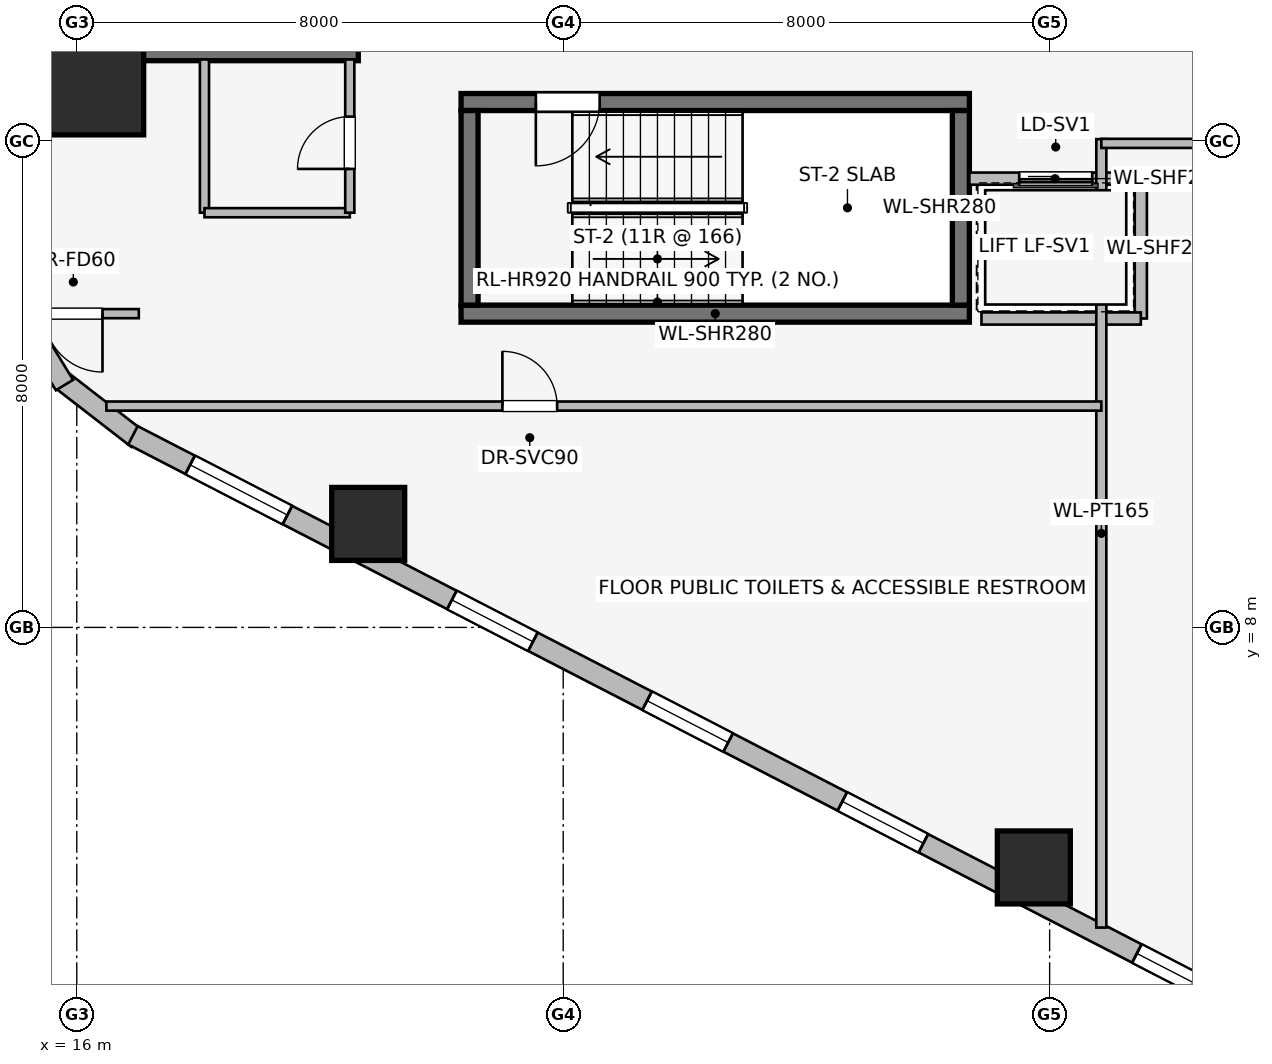
"""IFC4 building model, lengths in metres.
Left out: names, types, materials, properties, quantities, classifications, styles, units other than length and angle.
Written with IfcOpenShell. Run it as: python <this file> out.ifc"""

import sys

from ifc_helpers import new_model, si_unit, direction, frame, frame_2d, origin, origin_2d, place, context, subcontext, project, spatial, rectangle, extrude, element, fill, save


model = new_model("IFC4")
c1 = context("Model", 3, precision=1e-05, world=origin(), true_north=direction((0.0, 1.0)))
c2 = subcontext(c1, "Body", "Model", "MODEL_VIEW")
j1 = project(units=[si_unit("LENGTHUNIT", "METRE"), si_unit("PLANEANGLEUNIT", "RADIAN")], contexts=[c1])
p1 = place(None, origin())
s1 = spatial("IfcSite", under=j1, at=p1, CompositionType="ELEMENT")
p2 = place(p1, origin())
s2 = spatial("IfcBuilding", under=s1, at=p2, CompositionType="ELEMENT")
p3 = place(p2, frame((0.0, 0.0, 30.65)))
s3 = spatial("IfcBuildingStorey", under=s2, at=p3, CompositionType="ELEMENT", Elevation=30.65)
p4 = place(p3, frame((16.87, 17.46, 0.0), z_axis=(0.0, 0.0, 1.0), x_axis=(1.0, 0.0, 0.0)))
e1 = element("IfcWall", 1, at=p4, inside=s3, PredefinedType="SHEAR", context=c2, shape_type="SweptSolid", body=[
    extrude(rectangle(XDim=3.76, YDim=0.28, at=frame_2d((1.88, 0.0))), origin(), (0.0, 0.0, 1.0), 3.65),
])
p5 = place(p3, frame((22.32, 13.16, 0.0), z_axis=(0.0, 0.0, 1.0), x_axis=(1.0, 0.0, 0.0)))
e2 = element("IfcWall", 2, at=p5, inside=s3, PredefinedType="SHEAR", context=c2, shape_type="SweptSolid", body=[
    extrude(rectangle(XDim=8.36, YDim=0.28, at=frame_2d((4.18, 0.0))), origin(), (0.0, 0.0, 1.0), 3.65),
])
p6 = place(p3, frame((30.68, 16.64, 0.0), z_axis=(0.0, 0.0, 1.0), x_axis=(-1.0, 0.0, 0.0)))
e3 = element("IfcWall", 3, at=p6, inside=s3, PredefinedType="SHEAR", context=c2, shape_type="SweptSolid", body=[
    extrude(rectangle(XDim=8.36, YDim=0.28, at=frame_2d((4.18, 0.0))), origin(), (0.0, 0.0, 1.0), 3.65),
])
p7 = place(p6, frame((6.08, 0.0, 0.0)))
e4 = element("IfcOpeningElement", 4, at=p7, cuts=e3, PredefinedType="OPENING", context=c2, shape_type="SweptSolid", body=[
    extrude(rectangle(XDim=1.05, YDim=2.0, at=frame_2d((0.525, 1.0))), frame((0.0, 0.15, 0.0), z_axis=(0.0, -1.0, 0.0), x_axis=(1.0, 0.0, 0.0)), (0.0, 0.0, 1.0), 0.3),
])
for number, where, z_axis, x_axis in (
    (5, (22.46, 16.5, 0.0), (0.0, 0.0, 1.0), (0.0, -1.0, 0.0)),
    (6, (30.54, 13.3, 0.0), (0.0, 0.0, 1.0), (0.0, 1.0, 0.0)),
):
    element("IfcWall", number, at=place(p3, frame(where, z_axis=z_axis, x_axis=x_axis)), inside=s3, PredefinedType="SHEAR", context=c2, shape_type="SweptSolid", body=[
        extrude(rectangle(XDim=3.2, YDim=0.28, at=frame_2d((1.6, 0.0))), origin(), (0.0, 0.0, 1.0), 3.65),
    ])
p8 = place(p3, frame((16.3, 16.9, 0.0), z_axis=(0.0, 0.0, 1.0), x_axis=(1.0, 0.0, 0.0)))
e7 = element("IfcColumn", 7, at=p8, inside=s3, PredefinedType="COLUMN", context=c2, shape_type="SweptSolid", body=[
    extrude(rectangle(XDim=1.6, YDim=1.6, at=origin_2d()), origin(), (0.0, 0.0, 1.0), 3.65),
])
for number, where, z_axis, x_axis in (
    (8, (20.793, 9.702, 0.0), (0.0, 0.0, 1.0), (1.0, 0.0, 0.0)),
    (9, (31.74, 4.053, 0.0), (0.0, 0.0, 1.0), (1.0, 0.0, 0.0)),
):
    element("IfcColumn", number, at=place(p3, frame(where, z_axis=z_axis, x_axis=x_axis)), inside=s3, PredefinedType="COLUMN", context=c2, shape_type="SweptSolid", body=[
        extrude(rectangle(XDim=1.2, YDim=1.2, at=origin_2d()), origin(), (0.0, 0.0, 1.0), 3.65),
    ])
p9 = place(p3, frame((16.998, 11.099, 0.0), z_axis=(0.0, 0.0, 1.0), x_axis=(-0.790691856293, 0.61221433207, 0.0)))
e10 = element("IfcWall", 10, at=p9, inside=s3, PredefinedType="STANDARD", context=c2, shape_type="SweptSolid", body=[
    extrude(rectangle(XDim=1.676, YDim=0.33, at=frame_2d((0.838, 0.0))), origin(), (0.0, 0.0, 1.0), 3.39),
])
p10 = place(p3, frame((15.798, 11.985, 0.0), z_axis=(0.0, 0.0, 1.0), x_axis=(-0.520584129191, 0.853810379671, 0.0)))
e11 = element("IfcWall", 11, at=p10, inside=s3, PredefinedType="STANDARD", context=c2, shape_type="SweptSolid", body=[
    extrude(rectangle(XDim=1.677, YDim=0.33, at=frame_2d((0.838, 0.0))), origin(), (0.0, 0.0, 1.0), 3.39),
])
p11 = place(p3, frame((35.169, 1.743, 0.0), z_axis=(0.0, 0.0, 1.0), x_axis=(-0.888634413993, 0.458616264721, 0.0)))
e12 = element("IfcWall", 12, at=p11, inside=s3, PredefinedType="STANDARD", context=c2, shape_type="SweptSolid", body=[
    extrude(rectangle(XDim=20.531, YDim=0.34, at=frame_2d((10.266, 0.0))), origin(), (0.0, 0.0, 1.0), 2.684),
])
p12 = place(p11, frame((0.902, 0.0, 0.75)))
e13 = element("IfcOpeningElement", 13, at=p12, cuts=e12, PredefinedType="OPENING", context=c2, shape_type="SweptSolid", body=[
    extrude(rectangle(XDim=1.05, YDim=1.4, at=frame_2d((0.525, 0.7))), frame((0.0, 0.18, 0.0), z_axis=(0.0, -1.0, 0.0), x_axis=(1.0, 0.0, 0.0)), (0.0, 0.0, 1.0), 0.36),
])
p13 = place(p11, frame((5.903, 0.0, 0.75)))
e14 = element("IfcOpeningElement", 14, at=p13, cuts=e12, PredefinedType="OPENING", context=c2, shape_type="SweptSolid", body=[
    extrude(rectangle(XDim=1.5, YDim=1.5, at=frame_2d((0.75, 0.75))), frame((0.0, 0.18, 0.0), z_axis=(0.0, -1.0, 0.0), x_axis=(1.0, 0.0, 0.0)), (0.0, 0.0, 1.0), 0.36),
])
p14 = place(p11, frame((9.516, 0.0, 0.75)))
e15 = element("IfcOpeningElement", 15, at=p14, cuts=e12, PredefinedType="OPENING", context=c2, shape_type="SweptSolid", body=[
    extrude(rectangle(XDim=1.5, YDim=1.5, at=frame_2d((0.75, 0.75))), frame((0.0, 0.18, 0.0), z_axis=(0.0, -1.0, 0.0), x_axis=(1.0, 0.0, 0.0)), (0.0, 0.0, 1.0), 0.36),
])
p15 = place(p11, frame((13.129, 0.0, 0.75)))
e16 = element("IfcOpeningElement", 16, at=p15, cuts=e12, PredefinedType="OPENING", context=c2, shape_type="SweptSolid", body=[
    extrude(rectangle(XDim=1.5, YDim=1.5, at=frame_2d((0.75, 0.75))), frame((0.0, 0.18, 0.0), z_axis=(0.0, -1.0, 0.0), x_axis=(1.0, 0.0, 0.0)), (0.0, 0.0, 1.0), 0.36),
])
p16 = place(p11, frame((17.673, 0.0, 0.75)))
e17 = element("IfcOpeningElement", 17, at=p16, cuts=e12, PredefinedType="OPENING", context=c2, shape_type="SweptSolid", body=[
    extrude(rectangle(XDim=1.8, YDim=1.5, at=frame_2d((0.9, 0.75))), frame((0.0, 0.18, 0.0), z_axis=(0.0, -1.0, 0.0), x_axis=(1.0, 0.0, 0.0)), (0.0, 0.0, 1.0), 0.36),
])
p17 = place(p3, frame((33.5, 15.38, 0.0), z_axis=(0.0, 0.0, 1.0), x_axis=(-1.0, 0.0, 0.0)))
e18 = element("IfcWall", 18, at=p17, inside=s3, PredefinedType="PARTITIONING", context=c2, shape_type="SweptSolid", body=[
    extrude(rectangle(XDim=2.82, YDim=0.2, at=frame_2d((1.41, 0.0))), origin(), (0.0, 0.0, 1.0), 3.39),
])
p18 = place(p17, frame((0.8, 0.0, 0.0)))
e19 = element("IfcOpeningElement", 19, at=p18, cuts=e18, PredefinedType="OPENING", context=c2, shape_type="SweptSolid", body=[
    extrude(rectangle(XDim=1.2, YDim=2.2, at=frame_2d((0.6, 1.1))), frame((0.0, 0.11, 0.0), z_axis=(0.0, -1.0, 0.0), x_axis=(1.0, 0.0, 0.0)), (0.0, 0.0, 1.0), 0.22),
])
p19 = place(p3, frame((33.5, 13.08, 0.0), z_axis=(0.0, 0.0, 1.0), x_axis=(0.0, 1.0, 0.0)))
e20 = element("IfcWall", 20, at=p19, inside=s3, PredefinedType="PARTITIONING", context=c2, shape_type="SweptSolid", body=[
    extrude(rectangle(XDim=2.3, YDim=0.2, at=frame_2d((1.15, 0.0))), origin(), (0.0, 0.0, 1.0), 3.39),
])
p20 = place(p3, frame((30.879, 13.08, 0.0), z_axis=(0.0, 0.0, 1.0), x_axis=(1.0, 0.0, 0.0)))
e21 = element("IfcWall", 21, at=p20, inside=s3, PredefinedType="PARTITIONING", context=c2, shape_type="SweptSolid", body=[
    extrude(rectangle(XDim=2.621, YDim=0.2, at=frame_2d((1.311, 0.0))), origin(), (0.0, 0.0, 1.0), 3.39),
])
p21 = place(p3, frame((18.1, 17.34, 0.0), z_axis=(0.0, 0.0, 1.0), x_axis=(0.0, -1.0, 0.0)))
e22 = element("IfcWall", 22, at=p21, inside=s3, PredefinedType="PARTITIONING", context=c2, shape_type="SweptSolid", body=[
    extrude(rectangle(XDim=2.52, YDim=0.15, at=frame_2d((1.26, 0.0))), origin(), (0.0, 0.0, 1.0), 3.39),
])
p22 = place(p3, frame((18.1, 14.82, 0.0), z_axis=(0.0, 0.0, 1.0), x_axis=(1.0, 0.0, 0.0)))
e23 = element("IfcWall", 23, at=p22, inside=s3, PredefinedType="PARTITIONING", context=c2, shape_type="SweptSolid", body=[
    extrude(rectangle(XDim=2.39, YDim=0.15, at=frame_2d((1.195, 0.0))), origin(), (0.0, 0.0, 1.0), 3.39),
])
p23 = place(p3, frame((20.49, 14.82, 0.0), z_axis=(0.0, 0.0, 1.0), x_axis=(0.0, 1.0, 0.0)))
e24 = element("IfcWall", 24, at=p23, inside=s3, PredefinedType="PARTITIONING", context=c2, shape_type="SweptSolid", body=[
    extrude(rectangle(XDim=2.52, YDim=0.15, at=frame_2d((1.26, 0.0))), origin(), (0.0, 0.0, 1.0), 3.39),
])
p24 = place(p23, frame((0.72, 0.0, 0.0)))
e25 = element("IfcOpeningElement", 25, at=p24, cuts=e24, PredefinedType="OPENING", context=c2, shape_type="SweptSolid", body=[
    extrude(rectangle(XDim=0.86, YDim=2.0, at=frame_2d((0.43, 1.0))), frame((0.0, 0.085, 0.0), z_axis=(0.0, -1.0, 0.0), x_axis=(1.0, 0.0, 0.0)), (0.0, 0.0, 1.0), 0.17),
])
p25 = place(p3, frame((32.85, 3.064, 0.0), z_axis=(0.0, 0.0, 1.0), x_axis=(0.0, 1.0, 0.0)))
e26 = element("IfcWall", 26, at=p25, inside=s3, PredefinedType="PARTITIONING", context=c2, shape_type="SweptSolid", body=[
    extrude(rectangle(XDim=12.966, YDim=0.165, at=frame_2d((6.483, 0.0))), origin(), (0.0, 0.0, 1.0), 3.39),
])
p26 = place(p3, frame((16.487, 11.64, 0.0), z_axis=(0.0, 0.0, 1.0), x_axis=(1.0, 0.0, 0.0)))
e27 = element("IfcWall", 27, at=p26, inside=s3, PredefinedType="PARTITIONING", context=c2, shape_type="SweptSolid", body=[
    extrude(rectangle(XDim=16.363, YDim=0.15, at=frame_2d((8.182, 0.0))), origin(), (0.0, 0.0, 1.0), 3.39),
])
p27 = place(p26, frame((6.513, 0.0, 0.0)))
e28 = element("IfcOpeningElement", 28, at=p27, cuts=e27, PredefinedType="OPENING", context=c2, shape_type="SweptSolid", body=[
    extrude(rectangle(XDim=0.9, YDim=2.0, at=frame_2d((0.45, 1.0))), frame((0.0, 0.085, 0.0), z_axis=(0.0, -1.0, 0.0), x_axis=(1.0, 0.0, 0.0)), (0.0, 0.0, 1.0), 0.17),
])
p28 = place(p3, frame((17.02, 13.16, 0.0), z_axis=(0.0, 0.0, 1.0), x_axis=(-1.0, 0.0, 0.0)))
e29 = element("IfcWall", 29, at=p28, inside=s3, PredefinedType="PARTITIONING", context=c2, shape_type="SweptSolid", body=[
    extrude(rectangle(XDim=2.12, YDim=0.15, at=frame_2d((1.06, 0.0))), origin(), (0.0, 0.0, 1.0), 3.39),
])
p29 = place(p28, frame((0.597, 0.0, 0.0)))
e30 = element("IfcOpeningElement", 30, at=p29, cuts=e29, PredefinedType="OPENING", context=c2, shape_type="SweptSolid", body=[
    extrude(rectangle(XDim=0.96, YDim=2.0, at=frame_2d((0.48, 1.0))), frame((0.0, 0.085, 0.0), z_axis=(0.0, -1.0, 0.0), x_axis=(1.0, 0.0, 0.0)), (0.0, 0.0, 1.0), 0.17),
])
p30 = place(p3, frame((32.85, 15.96, 0.0), z_axis=(0.0, 0.0, 1.0), x_axis=(1.0, 0.0, 0.0)))
e31 = element("IfcWall", 31, at=p30, inside=s3, PredefinedType="PARTITIONING", context=c2, shape_type="SweptSolid", body=[
    extrude(rectangle(XDim=27.403, YDim=0.15, at=frame_2d((13.701, 0.0))), origin(), (0.0, 0.0, 1.0), 3.39),
])
p31 = place(p30, frame((13.235, 0.0, 0.0)))
e32 = element("IfcOpeningElement", 32, at=p31, cuts=e31, PredefinedType="OPENING", context=c2, shape_type="SweptSolid", body=[
    extrude(rectangle(XDim=0.96, YDim=2.0, at=frame_2d((0.48, 1.0))), frame((0.0, 0.085, 0.0), z_axis=(0.0, -1.0, 0.0), x_axis=(1.0, 0.0, 0.0)), (0.0, 0.0, 1.0), 0.17),
])
p32 = place(p12, origin())
e33 = element("IfcWindow", 33, at=p32, inside=s3, PartitioningType="SINGLE_PANEL", PredefinedType="WINDOW", context=c2, shape_type="SweptSolid", body=[
    extrude(rectangle(XDim=1.05, YDim=1.4, at=frame_2d((0.525, 0.7))), frame((0.0, 0.03, 0.0), z_axis=(0.0, -1.0, 0.0), x_axis=(1.0, 0.0, 0.0)), (0.0, 0.0, 1.0), 0.06),
])
fill(e13, e33)
p33 = place(p13, origin())
e34 = element("IfcWindow", 34, at=p33, inside=s3, PartitioningType="SINGLE_PANEL", PredefinedType="WINDOW", context=c2, shape_type="SweptSolid", body=[
    extrude(rectangle(XDim=1.5, YDim=1.5, at=frame_2d((0.75, 0.75))), frame((0.0, 0.03, 0.0), z_axis=(0.0, -1.0, 0.0), x_axis=(1.0, 0.0, 0.0)), (0.0, 0.0, 1.0), 0.06),
])
fill(e14, e34)
p34 = place(p14, origin())
e35 = element("IfcWindow", 35, at=p34, inside=s3, PartitioningType="SINGLE_PANEL", PredefinedType="WINDOW", context=c2, shape_type="SweptSolid", body=[
    extrude(rectangle(XDim=1.5, YDim=1.5, at=frame_2d((0.75, 0.75))), frame((0.0, 0.03, 0.0), z_axis=(0.0, -1.0, 0.0), x_axis=(1.0, 0.0, 0.0)), (0.0, 0.0, 1.0), 0.06),
])
fill(e15, e35)
p35 = place(p15, origin())
e36 = element("IfcWindow", 36, at=p35, inside=s3, PartitioningType="SINGLE_PANEL", PredefinedType="WINDOW", context=c2, shape_type="SweptSolid", body=[
    extrude(rectangle(XDim=1.5, YDim=1.5, at=frame_2d((0.75, 0.75))), frame((0.0, 0.03, 0.0), z_axis=(0.0, -1.0, 0.0), x_axis=(1.0, 0.0, 0.0)), (0.0, 0.0, 1.0), 0.06),
])
fill(e16, e36)
p36 = place(p16, origin())
e37 = element("IfcWindow", 37, at=p36, inside=s3, PartitioningType="SINGLE_PANEL", PredefinedType="WINDOW", context=c2, shape_type="SweptSolid", body=[
    extrude(rectangle(XDim=1.8, YDim=1.5, at=frame_2d((0.9, 0.75))), frame((0.0, 0.03, 0.0), z_axis=(0.0, -1.0, 0.0), x_axis=(1.0, 0.0, 0.0)), (0.0, 0.0, 1.0), 0.06),
])
fill(e17, e37)
p37 = place(p7, origin())
e38 = element("IfcDoor", 38, at=p37, inside=s3, OperationType="SINGLE_SWING_RIGHT", PredefinedType="DOOR", context=c2, shape_type="SweptSolid", body=[
    extrude(rectangle(XDim=1.05, YDim=2.0, at=frame_2d((0.525, 1.0))), frame((0.0, 0.025, 0.0), z_axis=(0.0, -1.0, 0.0), x_axis=(1.0, 0.0, 0.0)), (0.0, 0.0, 1.0), 0.05),
])
fill(e4, e38)
p38 = place(p18, origin())
e39 = element("IfcDoor", 39, at=p38, inside=s3, OperationType="SLIDING_TO_RIGHT", PredefinedType="DOOR", context=c2, shape_type="SweptSolid", body=[
    extrude(rectangle(XDim=1.2, YDim=2.2, at=frame_2d((0.6, 1.1))), frame((0.0, 0.025, 0.0), z_axis=(0.0, -1.0, 0.0), x_axis=(1.0, 0.0, 0.0)), (0.0, 0.0, 1.0), 0.05),
])
fill(e19, e39)
p39 = place(p24, origin())
e40 = element("IfcDoor", 40, at=p39, inside=s3, OperationType="SINGLE_SWING_LEFT", PredefinedType="DOOR", context=c2, shape_type="SweptSolid", body=[
    extrude(rectangle(XDim=0.86, YDim=2.0, at=frame_2d((0.43, 1.0))), frame((0.0, 0.025, 0.0), z_axis=(0.0, -1.0, 0.0), x_axis=(1.0, 0.0, 0.0)), (0.0, 0.0, 1.0), 0.05),
])
fill(e25, e40)
p40 = place(p27, origin())
e41 = element("IfcDoor", 41, at=p40, inside=s3, OperationType="SINGLE_SWING_LEFT", PredefinedType="DOOR", context=c2, shape_type="SweptSolid", body=[
    extrude(rectangle(XDim=0.9, YDim=2.0, at=frame_2d((0.45, 1.0))), frame((0.0, 0.025, 0.0), z_axis=(0.0, -1.0, 0.0), x_axis=(1.0, 0.0, 0.0)), (0.0, 0.0, 1.0), 0.05),
])
fill(e28, e41)
p41 = place(p29, origin())
e42 = element("IfcDoor", 42, at=p41, inside=s3, OperationType="SINGLE_SWING_LEFT", PredefinedType="DOOR", context=c2, shape_type="SweptSolid", body=[
    extrude(rectangle(XDim=0.96, YDim=2.0, at=frame_2d((0.48, 1.0))), frame((0.0, 0.025, 0.0), z_axis=(0.0, -1.0, 0.0), x_axis=(1.0, 0.0, 0.0)), (0.0, 0.0, 1.0), 0.05),
])
fill(e30, e42)
save(model, sys.argv[1])
